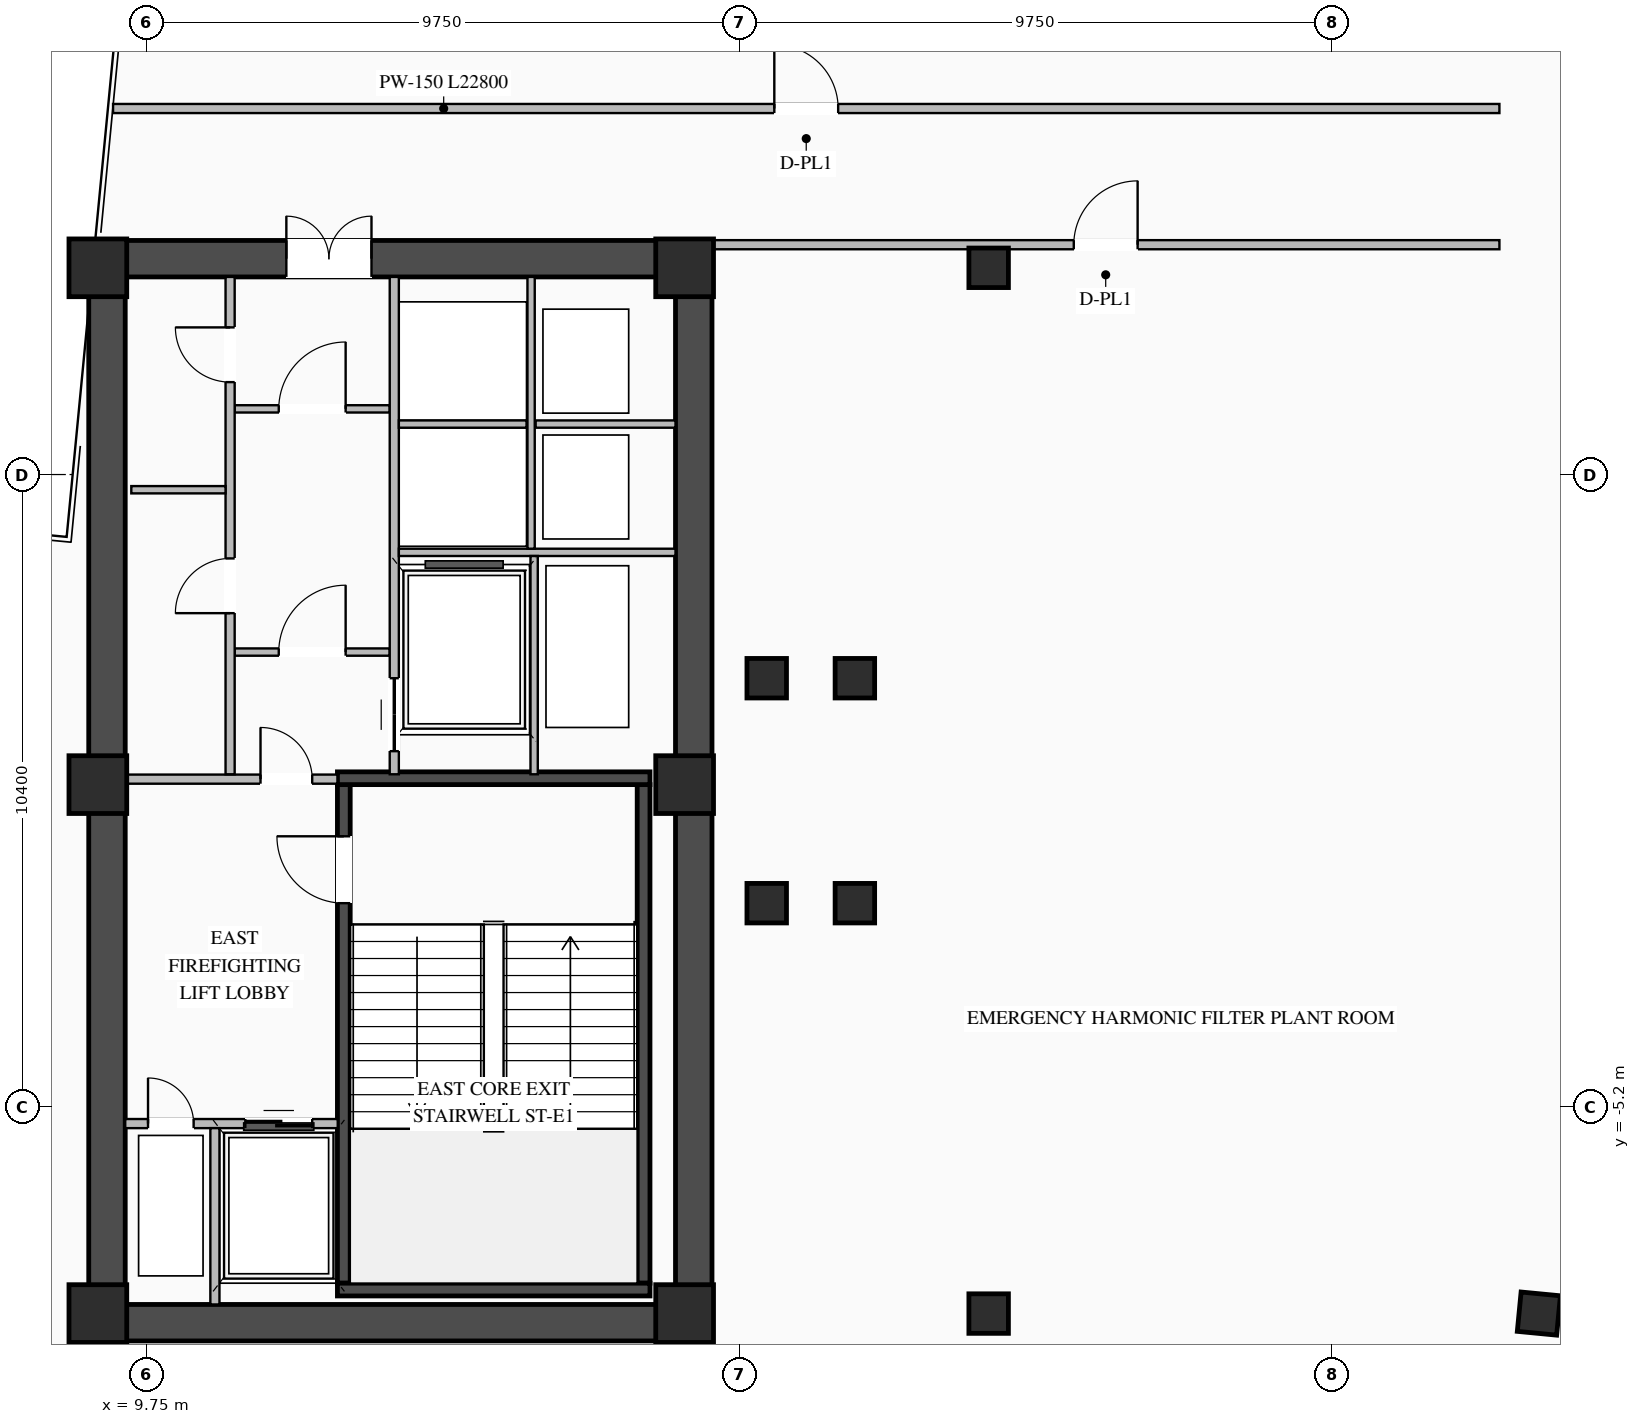
"""IFC4 building model, lengths in metres.
Left out: names, types, materials, properties, quantities, classifications, styles, units other than length and angle.
Written with IfcOpenShell. Run it as: python <this file> out.ifc"""

import sys

from ifc_helpers import new_model, si_unit, direction, frame, frame_2d, origin, origin_2d, place, context, subcontext, project, spatial, rectangle, i_section, extrude, element, fill, save


model = new_model("IFC4")
c1 = context("Model", 3, precision=1e-05, world=origin(), true_north=direction((0.0, 1.0)))
c2 = subcontext(c1, "Body", "Model", "MODEL_VIEW")
j1 = project(units=[si_unit("LENGTHUNIT", "METRE"), si_unit("PLANEANGLEUNIT", "RADIAN")], contexts=[c1])
p1 = place(None, origin())
s1 = spatial("IfcSite", under=j1, at=p1, CompositionType="ELEMENT")
p2 = place(p1, origin())
s2 = spatial("IfcBuilding", under=s1, at=p2, CompositionType="ELEMENT")
p3 = place(p2, frame((0.0, 0.0, 199.5)))
s3 = spatial("IfcBuildingStorey", under=s2, at=p3, CompositionType="ELEMENT", Elevation=199.5)
p4 = place(p3, frame((8.8, -8.75, 0.0), z_axis=(0.0, 0.0, 1.0), x_axis=(1.0, 0.0, 0.0)))
e1 = element("IfcWall", 1, at=p4, inside=s3, PredefinedType="SHEAR", context=c2, shape_type="SweptSolid", body=[
    extrude(rectangle(XDim=10.25, YDim=0.6, at=frame_2d((5.125, 0.0))), origin(), (0.0, 0.0, 1.0), 4.52),
])
p5 = place(p3, frame((8.8, 8.75, 0.0), z_axis=(0.0, 0.0, 1.0), x_axis=(1.0, 0.0, 0.0)))
e2 = element("IfcWall", 2, at=p5, inside=s3, PredefinedType="SHEAR", context=c2, shape_type="SweptSolid", body=[
    extrude(rectangle(XDim=10.25, YDim=0.6, at=frame_2d((5.125, 0.0))), origin(), (0.0, 0.0, 1.0), 4.52),
])
p6 = place(p5, frame((3.25, 0.0, 0.0)))
e3 = element("IfcOpeningElement", 3, at=p6, cuts=e2, PredefinedType="OPENING", context=c2, shape_type="SweptSolid", body=[
    extrude(rectangle(XDim=1.4, YDim=2.05, at=frame_2d((0.7, 1.025))), frame((0.0, 0.31, 0.0), z_axis=(0.0, -1.0, 0.0), x_axis=(1.0, 0.0, 0.0)), (0.0, 0.0, 1.0), 0.62),
])
for number, where, z_axis, x_axis in (
    (4, (9.1, -8.45, 0.0), (0.0, 0.0, 1.0), (0.0, 1.0, 0.0)),
    (5, (18.75, -8.45, 0.0), (0.0, 0.0, 1.0), (0.0, 1.0, 0.0)),
):
    element("IfcWall", number, at=place(p3, frame(where, z_axis=z_axis, x_axis=x_axis)), inside=s3, PredefinedType="SHEAR", context=c2, shape_type="SweptSolid", body=[
        extrude(rectangle(XDim=16.9, YDim=0.6, at=frame_2d((8.45, 0.0))), origin(), (0.0, 0.0, 1.0), 4.52),
    ])
p7 = place(p3, frame((12.995, -8.1, 0.0), z_axis=(0.0, 0.0, 1.0), x_axis=(0.0, 1.0, 0.0)))
e6 = element("IfcWall", 6, at=p7, inside=s3, PredefinedType="SHEAR", context=c2, shape_type="SweptSolid", body=[
    extrude(rectangle(XDim=8.2, YDim=0.21, at=frame_2d((4.1, 0.0))), origin(), (0.0, 0.0, 1.0), 4.52),
])
p8 = place(p7, frame((6.25, 0.0, 0.0)))
e7 = element("IfcOpeningElement", 7, at=p8, cuts=e6, PredefinedType="OPENING", context=c2, shape_type="SweptSolid", body=[
    extrude(rectangle(XDim=1.1, YDim=2.15, at=frame_2d((0.55, 1.075))), frame((0.0, 0.115, 0.0), z_axis=(0.0, -1.0, 0.0), x_axis=(1.0, 0.0, 0.0)), (0.0, 0.0, 1.0), 0.23),
])
p9 = place(p3, frame((17.925, -8.1, 0.0), z_axis=(0.0, 0.0, 1.0), x_axis=(0.0, 1.0, 0.0)))
e8 = element("IfcWall", 8, at=p9, inside=s3, PredefinedType="SHEAR", context=c2, shape_type="SweptSolid", body=[
    extrude(rectangle(XDim=8.2, YDim=0.21, at=frame_2d((4.1, 0.0))), origin(), (0.0, 0.0, 1.0), 4.52),
])
for number, where, z_axis, x_axis in (
    (9, (12.89, -8.205, 0.0), (0.0, 0.0, 1.0), (1.0, 0.0, 0.0)),
    (10, (18.03, 0.205, 0.0), (0.0, 0.0, 1.0), (-1.0, 0.0, 0.0)),
):
    element("IfcWall", number, at=place(p3, frame(where, z_axis=z_axis, x_axis=x_axis)), inside=s3, PredefinedType="SHEAR", context=c2, shape_type="SweptSolid", body=[
        extrude(rectangle(XDim=5.14, YDim=0.21, at=frame_2d((2.57, 0.0))), origin(), (0.0, 0.0, 1.0), 4.52),
    ])
for number, where, z_axis, x_axis in (
    (11, (8.95, -8.6, 0.0), (0.0, 0.0, 1.0), (1.0, 0.0, 0.0)),
    (12, (8.95, 0.1, 0.0), (0.0, 0.0, 1.0), (1.0, 0.0, 0.0)),
    (13, (8.95, 8.6, 0.0), (0.0, 0.0, 1.0), (1.0, 0.0, 0.0)),
    (14, (18.6, -8.6, 0.0), (0.0, 0.0, 1.0), (1.0, 0.0, 0.0)),
    (15, (18.6, 0.1, 0.0), (0.0, 0.0, 1.0), (1.0, 0.0, 0.0)),
    (16, (18.6, 8.6, 0.0), (0.0, 0.0, 1.0), (1.0, 0.0, 0.0)),
):
    element("IfcColumn", number, at=place(p3, frame(where, z_axis=z_axis, x_axis=x_axis)), inside=s3, PredefinedType="COLUMN", context=c2, shape_type="SweptSolid", body=[
        extrude(rectangle(XDim=0.95, YDim=0.95, at=origin_2d()), origin(), (0.0, 0.0, 1.0), 4.8),
    ])
for number, where, z_axis, x_axis in (
    (17, (19.95, -1.85, 0.0), (0.0, 0.0, 1.0), (1.0, 0.0, 0.0)),
    (18, (19.95, 1.85, 0.0), (0.0, 0.0, 1.0), (1.0, 0.0, 0.0)),
    (19, (21.4, -1.85, 0.0), (0.0, 0.0, 1.0), (1.0, 0.0, 0.0)),
    (20, (21.4, 1.85, 0.0), (0.0, 0.0, 1.0), (1.0, 0.0, 0.0)),
    (21, (23.6, -8.6, 0.0), (0.0, 0.0, 1.0), (1.0, 0.0, 0.0)),
    (22, (23.6, 8.6, 0.0), (0.0, 0.0, 1.0), (1.0, 0.0, 0.0)),
    (23, (32.649, -8.6, 0.0), (0.0, 0.0, 1.0), (0.995, -0.096, 0.0)),
):
    element("IfcColumn", number, at=place(p3, frame(where, z_axis=z_axis, x_axis=x_axis)), inside=s3, PredefinedType="COLUMN", context=c2, shape_type="SweptSolid", body=[
        extrude(i_section(OverallWidth=0.65, OverallDepth=0.65, WebThickness=0.028, FlangeThickness=0.04, at=origin_2d()), origin(), (0.0, 0.0, 1.0), 4.8),
    ])
p10 = place(p3, frame((9.4, -5.475, 0.0), z_axis=(0.0, 0.0, 1.0), x_axis=(1.0, 0.0, 0.0)))
e24 = element("IfcWall", 24, at=p10, inside=s3, PredefinedType="STANDARD", context=c2, shape_type="SweptSolid", body=[
    extrude(rectangle(XDim=3.495, YDim=0.15, at=frame_2d((1.748, 0.0))), origin(), (0.0, 0.0, 1.0), 4.5),
])
p11 = place(p10, frame((1.975, 0.0, 0.0)))
e25 = element("IfcOpeningElement", 25, at=p11, cuts=e24, PredefinedType="OPENING", context=c2, shape_type="SweptSolid", body=[
    extrude(rectangle(XDim=1.1, YDim=2.15, at=frame_2d((0.55, 1.075))), frame((0.0, 0.085, 0.0), z_axis=(0.0, -1.0, 0.0), x_axis=(1.0, 0.0, 0.0)), (0.0, 0.0, 1.0), 0.17),
])
p12 = place(p10, frame((0.375, 0.0, 0.0)))
e26 = element("IfcOpeningElement", 26, at=p12, cuts=e24, PredefinedType="OPENING", context=c2, shape_type="SweptSolid", body=[
    extrude(rectangle(XDim=0.75, YDim=2.05, at=frame_2d((0.375, 1.025))), frame((0.0, 0.085, 0.0), z_axis=(0.0, -1.0, 0.0), x_axis=(1.0, 0.0, 0.0)), (0.0, 0.0, 1.0), 0.17),
])
p13 = place(p3, frame((10.875, -8.45, 0.0), z_axis=(0.0, 0.0, 1.0), x_axis=(0.0, 1.0, 0.0)))
e27 = element("IfcWall", 27, at=p13, inside=s3, PredefinedType="STANDARD", context=c2, shape_type="SweptSolid", body=[
    extrude(rectangle(XDim=2.9, YDim=0.15, at=frame_2d((1.45, 0.0))), origin(), (0.0, 0.0, 1.0), 4.5),
])
p14 = place(p3, frame((9.4, 0.19, 0.0), z_axis=(0.0, 0.0, 1.0), x_axis=(1.0, 0.0, 0.0)))
e28 = element("IfcWall", 28, at=p14, inside=s3, PredefinedType="STANDARD", context=c2, shape_type="SweptSolid", body=[
    extrude(rectangle(XDim=3.49, YDim=0.15, at=frame_2d((1.745, 0.0))), origin(), (0.0, 0.0, 1.0), 3.895),
])
p15 = place(p14, frame((2.225, 0.0, 0.0)))
e29 = element("IfcOpeningElement", 29, at=p15, cuts=e28, PredefinedType="OPENING", context=c2, shape_type="SweptSolid", body=[
    extrude(rectangle(XDim=0.85, YDim=2.04, at=frame_2d((0.425, 1.02))), frame((0.0, 0.085, 0.0), z_axis=(0.0, -1.0, 0.0), x_axis=(1.0, 0.0, 0.0)), (0.0, 0.0, 1.0), 0.17),
])
p16 = place(p3, frame((11.2, 2.28, 0.0), z_axis=(0.0, 0.0, 1.0), x_axis=(1.0, 0.0, 0.0)))
e30 = element("IfcWall", 30, at=p16, inside=s3, PredefinedType="STANDARD", context=c2, shape_type="SweptSolid", body=[
    extrude(rectangle(XDim=2.55, YDim=0.12, at=frame_2d((1.275, 0.0))), origin(), (0.0, 0.0, 1.0), 4.5),
])
p17 = place(p16, frame((0.725, 0.0, 0.0)))
e31 = element("IfcOpeningElement", 31, at=p17, cuts=e30, PredefinedType="OPENING", context=c2, shape_type="SweptSolid", body=[
    extrude(rectangle(XDim=1.1, YDim=2.1, at=frame_2d((0.55, 1.05))), frame((0.0, 0.07, 0.0), z_axis=(0.0, -1.0, 0.0), x_axis=(1.0, 0.0, 0.0)), (0.0, 0.0, 1.0), 0.14),
])
p18 = place(p3, frame((11.2, 6.28, 0.0), z_axis=(0.0, 0.0, 1.0), x_axis=(1.0, 0.0, 0.0)))
e32 = element("IfcWall", 32, at=p18, inside=s3, PredefinedType="STANDARD", context=c2, shape_type="SweptSolid", body=[
    extrude(rectangle(XDim=2.55, YDim=0.12, at=frame_2d((1.275, 0.0))), origin(), (0.0, 0.0, 1.0), 4.5),
])
p19 = place(p18, frame((0.725, 0.0, 0.0)))
e33 = element("IfcOpeningElement", 33, at=p19, cuts=e32, PredefinedType="OPENING", context=c2, shape_type="SweptSolid", body=[
    extrude(rectangle(XDim=1.1, YDim=2.1, at=frame_2d((0.55, 1.05))), frame((0.0, 0.07, 0.0), z_axis=(0.0, -1.0, 0.0), x_axis=(1.0, 0.0, 0.0)), (0.0, 0.0, 1.0), 0.14),
])
p20 = place(p3, frame((11.125, 0.27, 0.0), z_axis=(0.0, 0.0, 1.0), x_axis=(0.0, 1.0, 0.0)))
e34 = element("IfcWall", 34, at=p20, inside=s3, PredefinedType="STANDARD", context=c2, shape_type="SweptSolid", body=[
    extrude(rectangle(XDim=8.18, YDim=0.15, at=frame_2d((4.09, 0.0))), origin(), (0.0, 0.0, 1.0), 4.5),
])
p21 = place(p20, frame((2.65, 0.0, 0.0)))
e35 = element("IfcOpeningElement", 35, at=p21, cuts=e34, PredefinedType="OPENING", context=c2, shape_type="SweptSolid", body=[
    extrude(rectangle(XDim=0.9, YDim=2.05, at=frame_2d((0.45, 1.025))), frame((0.0, 0.085, 0.0), z_axis=(0.0, -1.0, 0.0), x_axis=(1.0, 0.0, 0.0)), (0.0, 0.0, 1.0), 0.17),
])
p22 = place(p20, frame((6.45, 0.0, 0.0)))
e36 = element("IfcOpeningElement", 36, at=p22, cuts=e34, PredefinedType="OPENING", context=c2, shape_type="SweptSolid", body=[
    extrude(rectangle(XDim=0.9, YDim=2.05, at=frame_2d((0.45, 1.025))), frame((0.0, 0.085, 0.0), z_axis=(0.0, -1.0, 0.0), x_axis=(1.0, 0.0, 0.0)), (0.0, 0.0, 1.0), 0.17),
])
p23 = place(p3, frame((9.5, 4.95, 0.0), z_axis=(0.0, 0.0, 1.0), x_axis=(1.0, 0.0, 0.0)))
e37 = element("IfcWall", 37, at=p23, inside=s3, PredefinedType="STANDARD", context=c2, shape_type="SweptSolid", body=[
    extrude(rectangle(XDim=1.55, YDim=0.12, at=frame_2d((0.775, 0.0))), origin(), (0.0, 0.0, 1.0), 4.5),
])
p24 = place(p3, frame((13.825, 0.27, 0.0), z_axis=(0.0, 0.0, 1.0), x_axis=(0.0, 1.0, 0.0)))
e38 = element("IfcWall", 38, at=p24, inside=s3, PredefinedType="STANDARD", context=c2, shape_type="SweptSolid", body=[
    extrude(rectangle(XDim=8.18, YDim=0.15, at=frame_2d((4.09, 0.0))), origin(), (0.0, 0.0, 1.0), 4.5),
])
p25 = place(p24, frame((0.38, 0.0, 0.0)))
e39 = element("IfcOpeningElement", 39, at=p25, cuts=e38, PredefinedType="OPENING", context=c2, shape_type="SweptSolid", body=[
    extrude(rectangle(XDim=1.2, YDim=2.1, at=frame_2d((0.6, 1.05))), frame((0.0, 0.085, 0.0), z_axis=(0.0, -1.0, 0.0), x_axis=(1.0, 0.0, 0.0)), (0.0, 0.0, 1.0), 0.17),
])
p26 = place(p3, frame((13.9, 3.92, 0.0), z_axis=(0.0, 0.0, 1.0), x_axis=(1.0, 0.0, 0.0)))
e40 = element("IfcWall", 40, at=p26, inside=s3, PredefinedType="STANDARD", context=c2, shape_type="SweptSolid", body=[
    extrude(rectangle(XDim=4.55, YDim=0.12, at=frame_2d((2.275, 0.0))), origin(), (0.0, 0.0, 1.0), 4.5),
])
p27 = place(p3, frame((16.15, 6.03, 0.0), z_axis=(0.0, 0.0, 1.0), x_axis=(1.0, 0.0, 0.0)))
e41 = element("IfcWall", 41, at=p27, inside=s3, PredefinedType="STANDARD", context=c2, shape_type="SweptSolid", body=[
    extrude(rectangle(XDim=2.3, YDim=0.12, at=frame_2d((1.15, 0.0))), origin(), (0.0, 0.0, 1.0), 4.5),
])
p28 = place(p3, frame((16.075, 3.98, 0.0), z_axis=(0.0, 0.0, 1.0), x_axis=(0.0, 1.0, 0.0)))
e42 = element("IfcWall", 42, at=p28, inside=s3, PredefinedType="STANDARD", context=c2, shape_type="SweptSolid", body=[
    extrude(rectangle(XDim=4.47, YDim=0.12, at=frame_2d((2.235, 0.0))), origin(), (0.0, 0.0, 1.0), 4.5),
])
p29 = place(p3, frame((13.9, 6.03, 0.0), z_axis=(0.0, 0.0, 1.0), x_axis=(1.0, 0.0, 0.0)))
e43 = element("IfcWall", 43, at=p29, inside=s3, PredefinedType="STANDARD", context=c2, shape_type="SweptSolid", body=[
    extrude(rectangle(XDim=2.1, YDim=0.12, at=frame_2d((1.05, 0.0))), origin(), (0.0, 0.0, 1.0), 4.5),
])
p30 = place(p3, frame((16.125, 0.27, 0.0), z_axis=(0.0, 0.0, 1.0), x_axis=(0.0, 1.0, 0.0)))
e44 = element("IfcWall", 44, at=p30, inside=s3, PredefinedType="STANDARD", context=c2, shape_type="SweptSolid", body=[
    extrude(rectangle(XDim=3.59, YDim=0.12, at=frame_2d((1.795, 0.0))), origin(), (0.0, 0.0, 1.0), 4.5),
])
p31 = place(p3, frame((9.2, 11.22, 0.0), z_axis=(0.0, 0.0, 1.0), x_axis=(1.0, 0.0, 0.0)))
e45 = element("IfcWall", 45, at=p31, inside=s3, PredefinedType="STANDARD", context=c2, shape_type="SweptSolid", body=[
    extrude(rectangle(XDim=22.8, YDim=0.15, at=frame_2d((11.4, 0.0))), origin(), (0.0, 0.0, 1.0), 4.5),
])
p32 = place(p31, frame((10.875, 0.0, 0.0)))
e46 = element("IfcOpeningElement", 46, at=p32, cuts=e45, PredefinedType="OPENING", context=c2, shape_type="SweptSolid", body=[
    extrude(rectangle(XDim=1.05, YDim=2.08, at=frame_2d((0.525, 1.04))), frame((0.0, 0.085, 0.0), z_axis=(0.0, -1.0, 0.0), x_axis=(1.0, 0.0, 0.0)), (0.0, 0.0, 1.0), 0.17),
])
p33 = place(p3, frame((19.05, 8.98, 0.0), z_axis=(0.0, 0.0, 1.0), x_axis=(1.0, 0.0, 0.0)))
e47 = element("IfcWall", 47, at=p33, inside=s3, PredefinedType="STANDARD", context=c2, shape_type="SweptSolid", body=[
    extrude(rectangle(XDim=12.95, YDim=0.15, at=frame_2d((6.475, 0.0))), origin(), (0.0, 0.0, 1.0), 4.5),
])
p34 = place(p33, frame((5.95, 0.0, 0.0)))
e48 = element("IfcOpeningElement", 48, at=p34, cuts=e47, PredefinedType="OPENING", context=c2, shape_type="SweptSolid", body=[
    extrude(rectangle(XDim=1.05, YDim=2.08, at=frame_2d((0.525, 1.04))), frame((0.0, 0.085, 0.0), z_axis=(0.0, -1.0, 0.0), x_axis=(1.0, 0.0, 0.0)), (0.0, 0.0, 1.0), 0.17),
])
p35 = place(p8, origin())
e49 = element("IfcDoor", 49, at=p35, inside=s3, OperationType="SINGLE_SWING_RIGHT", PredefinedType="DOOR", context=c2, shape_type="SweptSolid", body=[
    extrude(rectangle(XDim=1.1, YDim=2.15, at=frame_2d((0.55, 1.075))), frame((0.0, 0.025, 0.0), z_axis=(0.0, -1.0, 0.0), x_axis=(1.0, 0.0, 0.0)), (0.0, 0.0, 1.0), 0.05),
])
fill(e7, e49)
p36 = place(p11, origin())
e50 = element("IfcDoor", 50, at=p36, inside=s3, OperationType="DOUBLE_DOOR_SLIDING", PredefinedType="DOOR", context=c2, shape_type="SweptSolid", body=[
    extrude(rectangle(XDim=1.1, YDim=2.15, at=frame_2d((0.55, 1.075))), frame((0.0, 0.025, 0.0), z_axis=(0.0, -1.0, 0.0), x_axis=(1.0, 0.0, 0.0)), (0.0, 0.0, 1.0), 0.05),
])
fill(e25, e50)
p37 = place(p12, origin())
e51 = element("IfcDoor", 51, at=p37, inside=s3, OperationType="SINGLE_SWING_LEFT", PredefinedType="DOOR", context=c2, shape_type="SweptSolid", body=[
    extrude(rectangle(XDim=0.75, YDim=2.05, at=frame_2d((0.375, 1.025))), frame((0.0, 0.025, 0.0), z_axis=(0.0, -1.0, 0.0), x_axis=(1.0, 0.0, 0.0)), (0.0, 0.0, 1.0), 0.05),
])
fill(e26, e51)
p38 = place(p15, origin())
e52 = element("IfcDoor", 52, at=p38, inside=s3, OperationType="SINGLE_SWING_LEFT", PredefinedType="DOOR", context=c2, shape_type="SweptSolid", body=[
    extrude(rectangle(XDim=0.85, YDim=2.04, at=frame_2d((0.425, 1.02))), frame((0.0, 0.025, 0.0), z_axis=(0.0, -1.0, 0.0), x_axis=(1.0, 0.0, 0.0)), (0.0, 0.0, 1.0), 0.05),
])
fill(e29, e52)
p39 = place(p17, origin())
e53 = element("IfcDoor", 53, at=p39, inside=s3, OperationType="SINGLE_SWING_RIGHT", PredefinedType="DOOR", context=c2, shape_type="SweptSolid", body=[
    extrude(rectangle(XDim=1.1, YDim=2.1, at=frame_2d((0.55, 1.05))), frame((0.0, 0.025, 0.0), z_axis=(0.0, -1.0, 0.0), x_axis=(1.0, 0.0, 0.0)), (0.0, 0.0, 1.0), 0.05),
])
fill(e31, e53)
p40 = place(p19, origin())
e54 = element("IfcDoor", 54, at=p40, inside=s3, OperationType="SINGLE_SWING_RIGHT", PredefinedType="DOOR", context=c2, shape_type="SweptSolid", body=[
    extrude(rectangle(XDim=1.1, YDim=2.1, at=frame_2d((0.55, 1.05))), frame((0.0, 0.025, 0.0), z_axis=(0.0, -1.0, 0.0), x_axis=(1.0, 0.0, 0.0)), (0.0, 0.0, 1.0), 0.05),
])
fill(e33, e54)
p41 = place(p6, origin())
e55 = element("IfcDoor", 55, at=p41, inside=s3, OperationType="DOUBLE_DOOR_SINGLE_SWING", PredefinedType="DOOR", context=c2, shape_type="SweptSolid", body=[
    extrude(rectangle(XDim=1.4, YDim=2.05, at=frame_2d((0.7, 1.025))), frame((0.0, 0.245, 0.0), z_axis=(0.0, -1.0, 0.0), x_axis=(1.0, 0.0, 0.0)), (0.0, 0.0, 1.0), 0.05),
])
fill(e3, e55)
p42 = place(p21, origin())
e56 = element("IfcDoor", 56, at=p42, inside=s3, OperationType="SINGLE_SWING_LEFT", PredefinedType="DOOR", context=c2, shape_type="SweptSolid", body=[
    extrude(rectangle(XDim=0.9, YDim=2.05, at=frame_2d((0.45, 1.025))), frame((0.0, 0.025, 0.0), z_axis=(0.0, -1.0, 0.0), x_axis=(1.0, 0.0, 0.0)), (0.0, 0.0, 1.0), 0.05),
])
fill(e35, e56)
p43 = place(p22, origin())
e57 = element("IfcDoor", 57, at=p43, inside=s3, OperationType="SINGLE_SWING_RIGHT", PredefinedType="DOOR", context=c2, shape_type="SweptSolid", body=[
    extrude(rectangle(XDim=0.9, YDim=2.05, at=frame_2d((0.45, 1.025))), frame((0.0, 0.025, 0.0), z_axis=(0.0, -1.0, 0.0), x_axis=(1.0, 0.0, 0.0)), (0.0, 0.0, 1.0), 0.05),
])
fill(e36, e57)
p44 = place(p25, origin())
e58 = element("IfcDoor", 58, at=p44, inside=s3, OperationType="DOUBLE_DOOR_SLIDING", PredefinedType="DOOR", context=c2, shape_type="SweptSolid", body=[
    extrude(rectangle(XDim=1.2, YDim=2.1, at=frame_2d((0.6, 1.05))), frame((0.0, 0.025, 0.0), z_axis=(0.0, -1.0, 0.0), x_axis=(1.0, 0.0, 0.0)), (0.0, 0.0, 1.0), 0.05),
])
fill(e39, e58)
p45 = place(p32, origin())
e59 = element("IfcDoor", 59, at=p45, inside=s3, OperationType="SINGLE_SWING_LEFT", PredefinedType="DOOR", context=c2, shape_type="SweptSolid", body=[
    extrude(rectangle(XDim=1.05, YDim=2.08, at=frame_2d((0.525, 1.04))), frame((0.0, 0.025, 0.0), z_axis=(0.0, -1.0, 0.0), x_axis=(1.0, 0.0, 0.0)), (0.0, 0.0, 1.0), 0.05),
])
fill(e46, e59)
p46 = place(p34, origin())
e60 = element("IfcDoor", 60, at=p46, inside=s3, OperationType="SINGLE_SWING_RIGHT", PredefinedType="DOOR", context=c2, shape_type="SweptSolid", body=[
    extrude(rectangle(XDim=1.05, YDim=2.08, at=frame_2d((0.525, 1.04))), frame((0.0, 0.025, 0.0), z_axis=(0.0, -1.0, 0.0), x_axis=(1.0, 0.0, 0.0)), (0.0, 0.0, 1.0), 0.05),
])
fill(e48, e60)
save(model, sys.argv[1])
